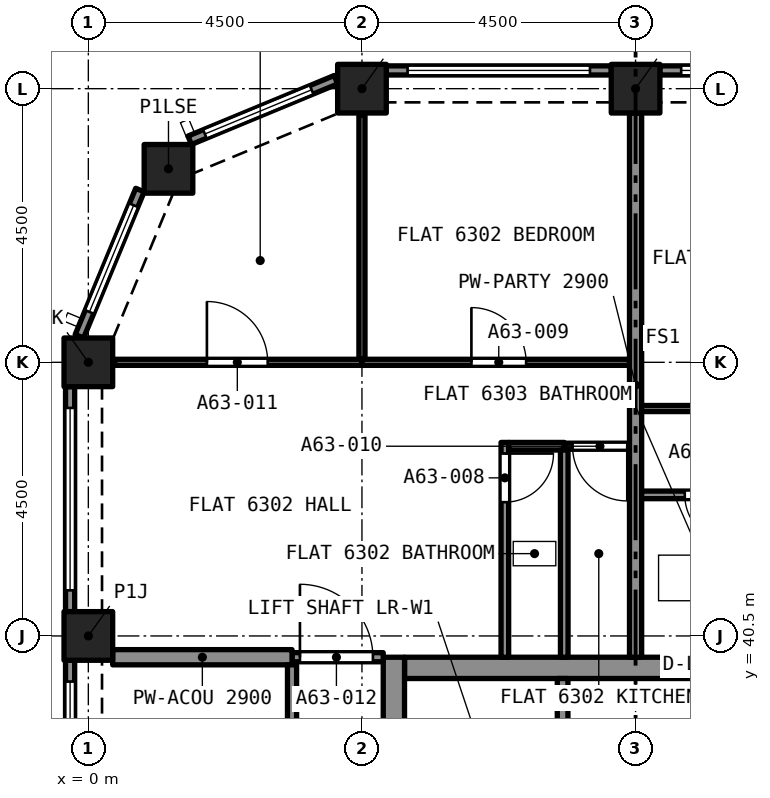
"""IFC4 building model, lengths in metres.
Left out: names, types, materials, properties, quantities, classifications, styles, units other than length and angle.
Written with IfcOpenShell. Run it as: python <this file> out.ifc"""

import sys

from ifc_helpers import new_model, si_unit, direction, frame, frame_2d, origin, origin_2d, place, context, subcontext, project, spatial, rectangle, extrude, element, fill, save


model = new_model("IFC4")
c1 = context("Model", 3, precision=1e-05, world=origin(), true_north=direction((0.0, 1.0)))
c2 = subcontext(c1, "Body", "Model", "MODEL_VIEW")
j1 = project(units=[si_unit("LENGTHUNIT", "METRE"), si_unit("PLANEANGLEUNIT", "RADIAN")], contexts=[c1])
p1 = place(None, origin())
s1 = spatial("IfcSite", under=j1, at=p1, CompositionType="ELEMENT")
p2 = place(p1, origin())
s2 = spatial("IfcBuilding", under=s1, at=p2, CompositionType="ELEMENT")
p3 = place(p2, frame((0.0, 0.0, 226.095)))
s3 = spatial("IfcBuildingStorey", under=s2, at=p3, CompositionType="ELEMENT", Elevation=226.095)
for number, where, z_axis, x_axis in (
    (1, (0.0, 40.5, 0.0), (0.0, 0.0, 1.0), (1.0, 0.0, 0.0)),
    (2, (0.0, 45.0, 0.0), (0.0, 0.0, 1.0), (1.0, 0.0, 0.0)),
    (3, (1.318, 48.182, 0.0), (0.0, 0.0, 1.0), (1.0, 0.0, 0.0)),
    (4, (4.5, 49.5, 0.0), (0.0, 0.0, 1.0), (1.0, 0.0, 0.0)),
    (5, (9.0, 49.5, 0.0), (0.0, 0.0, 1.0), (1.0, 0.0, 0.0)),
):
    element("IfcColumn", number, at=place(p3, frame(where, z_axis=z_axis, x_axis=x_axis)), inside=s3, PredefinedType="COLUMN", context=c2, shape_type="SweptSolid", body=[
        extrude(rectangle(XDim=0.8, YDim=0.8, at=origin_2d()), origin(), (0.0, 0.0, 1.0), 3.2),
    ])
p4 = place(p3, frame((5.2, 39.975, 0.0), z_axis=(0.0, 0.0, 1.0), x_axis=(1.0, 0.0, 0.0)))
e6 = element("IfcWall", 6, at=p4, inside=s3, PredefinedType="SOLIDWALL", context=c2, shape_type="SweptSolid", body=[
    extrude(rectangle(XDim=7.6, YDim=0.35, at=frame_2d((3.8, 0.0))), origin(), (0.0, 0.0, 1.0), 3.2),
])
p5 = place(p3, frame((5.025, 27.35, 0.0), z_axis=(0.0, 0.0, 1.0), x_axis=(0.0, 1.0, 0.0)))
e7 = element("IfcWall", 7, at=p5, inside=s3, PredefinedType="SOLIDWALL", context=c2, shape_type="SweptSolid", body=[
    extrude(rectangle(XDim=12.8, YDim=0.35, at=frame_2d((6.4, 0.0))), origin(), (0.0, 0.0, 1.0), 3.2),
])
p6 = place(p5, frame((8.6, 0.0, 0.0)))
e8 = element("IfcOpeningElement", 8, at=p6, cuts=e7, PredefinedType="OPENING", context=c2, shape_type="SweptSolid", body=[
    extrude(rectangle(XDim=1.2, YDim=2.1, at=frame_2d((0.6, 1.05))), frame((0.0, 0.185, 0.0), z_axis=(0.0, -1.0, 0.0), x_axis=(1.0, 0.0, 0.0)), (0.0, 0.0, 1.0), 0.37),
])
p7 = place(p3, frame((9.4, 49.8, 0.0), z_axis=(0.0, 0.0, 1.0), x_axis=(1.0, 0.0, 0.0)))
e9 = element("IfcWall", 9, at=p7, inside=s3, PredefinedType="SOLIDWALL", context=c2, shape_type="SweptSolid", body=[
    extrude(rectangle(XDim=3.7, YDim=0.15, at=frame_2d((1.85, 0.0))), origin(), (0.0, 0.0, 1.0), 3.2),
])
p8 = place(p7, frame((0.35, 0.0, 0.45)))
e10 = element("IfcOpeningElement", 10, at=p8, cuts=e9, PredefinedType="OPENING", context=c2, shape_type="SweptSolid", body=[
    extrude(rectangle(XDim=3.0, YDim=1.95, at=frame_2d((1.5, 0.975))), frame((0.0, 0.085, 0.0), z_axis=(0.0, -1.0, 0.0), x_axis=(1.0, 0.0, 0.0)), (0.0, 0.0, 1.0), 0.17),
])
p9 = place(p3, frame((4.9, 49.8, 0.0), z_axis=(0.0, 0.0, 1.0), x_axis=(1.0, 0.0, 0.0)))
e11 = element("IfcWall", 11, at=p9, inside=s3, PredefinedType="SOLIDWALL", context=c2, shape_type="SweptSolid", body=[
    extrude(rectangle(XDim=3.7, YDim=0.15, at=frame_2d((1.85, 0.0))), origin(), (0.0, 0.0, 1.0), 3.2),
])
p10 = place(p9, frame((0.35, 0.0, 0.45)))
e12 = element("IfcOpeningElement", 12, at=p10, cuts=e11, PredefinedType="OPENING", context=c2, shape_type="SweptSolid", body=[
    extrude(rectangle(XDim=3.0, YDim=1.95, at=frame_2d((1.5, 0.975))), frame((0.0, 0.085, 0.0), z_axis=(0.0, -1.0, 0.0), x_axis=(1.0, 0.0, 0.0)), (0.0, 0.0, 1.0), 0.17),
])
p11 = place(p3, frame((1.667, 48.651, 0.0), z_axis=(0.0, 0.0, 1.0), x_axis=(0.923885342263, 0.382669406082, 0.0)))
e13 = element("IfcWall", 13, at=p11, inside=s3, PredefinedType="SOLIDWALL", context=c2, shape_type="SweptSolid", body=[
    extrude(rectangle(XDim=2.602, YDim=0.15, at=frame_2d((1.301, 0.0))), origin(), (0.0, 0.0, 1.0), 3.2),
])
p12 = place(p11, frame((0.27, 0.0, 0.45)))
e14 = element("IfcOpeningElement", 14, at=p12, cuts=e13, PredefinedType="OPENING", context=c2, shape_type="SweptSolid", body=[
    extrude(rectangle(XDim=1.9, YDim=1.95, at=frame_2d((0.95, 0.975))), frame((0.0, 0.085, 0.0), z_axis=(0.0, -1.0, 0.0), x_axis=(1.0, 0.0, 0.0)), (0.0, 0.0, 1.0), 0.17),
])
p13 = place(p3, frame((-0.147, 45.429, 0.0), z_axis=(0.0, 0.0, 1.0), x_axis=(0.382669406082, 0.923885342263, 0.0)))
e15 = element("IfcWall", 15, at=p13, inside=s3, PredefinedType="SOLIDWALL", context=c2, shape_type="SweptSolid", body=[
    extrude(rectangle(XDim=2.602, YDim=0.15, at=frame_2d((1.301, 0.0))), origin(), (0.0, 0.0, 1.0), 3.2),
])
p14 = place(p13, frame((0.432, 0.0, 0.45)))
e16 = element("IfcOpeningElement", 16, at=p14, cuts=e15, PredefinedType="OPENING", context=c2, shape_type="SweptSolid", body=[
    extrude(rectangle(XDim=1.9, YDim=1.95, at=frame_2d((0.95, 0.975))), frame((0.0, 0.085, 0.0), z_axis=(0.0, -1.0, 0.0), x_axis=(1.0, 0.0, 0.0)), (0.0, 0.0, 1.0), 0.17),
])
p15 = place(p3, frame((-0.3, 40.9, 0.0), z_axis=(0.0, 0.0, 1.0), x_axis=(0.0, 1.0, 0.0)))
e17 = element("IfcWall", 17, at=p15, inside=s3, PredefinedType="SOLIDWALL", context=c2, shape_type="SweptSolid", body=[
    extrude(rectangle(XDim=3.7, YDim=0.15, at=frame_2d((1.85, 0.0))), origin(), (0.0, 0.0, 1.0), 3.2),
])
p16 = place(p15, frame((0.35, 0.0, 0.45)))
e18 = element("IfcOpeningElement", 18, at=p16, cuts=e17, PredefinedType="OPENING", context=c2, shape_type="SweptSolid", body=[
    extrude(rectangle(XDim=3.0, YDim=1.95, at=frame_2d((1.5, 0.975))), frame((0.0, 0.085, 0.0), z_axis=(0.0, -1.0, 0.0), x_axis=(1.0, 0.0, 0.0)), (0.0, 0.0, 1.0), 0.17),
])
p17 = place(p3, frame((-0.3, 36.4, 0.0), z_axis=(0.0, 0.0, 1.0), x_axis=(0.0, 1.0, 0.0)))
e19 = element("IfcWall", 19, at=p17, inside=s3, PredefinedType="SOLIDWALL", context=c2, shape_type="SweptSolid", body=[
    extrude(rectangle(XDim=3.7, YDim=0.15, at=frame_2d((1.85, 0.0))), origin(), (0.0, 0.0, 1.0), 3.2),
])
p18 = place(p17, frame((0.35, 0.0, 0.45)))
e20 = element("IfcOpeningElement", 20, at=p18, cuts=e19, PredefinedType="OPENING", context=c2, shape_type="SweptSolid", body=[
    extrude(rectangle(XDim=3.0, YDim=1.95, at=frame_2d((1.5, 0.975))), frame((0.0, 0.085, 0.0), z_axis=(0.0, -1.0, 0.0), x_axis=(1.0, 0.0, 0.0)), (0.0, 0.0, 1.0), 0.17),
])
p19 = place(p3, frame((6.85, 43.683, 0.0), z_axis=(0.0, 0.0, 1.0), x_axis=(0.0, -1.0, 0.0)))
e21 = element("IfcWall", 21, at=p19, inside=s3, PredefinedType="PARTITIONING", context=c2, shape_type="SweptSolid", body=[
    extrude(rectangle(XDim=3.533, YDim=0.125, at=frame_2d((1.766, 0.0))), origin(), (0.0, 0.0, 1.0), 2.9),
])
p20 = place(p19, frame((0.183, 0.0, 0.0)))
e22 = element("IfcOpeningElement", 22, at=p20, cuts=e21, PredefinedType="OPENING", context=c2, shape_type="SweptSolid", body=[
    extrude(rectangle(XDim=0.8, YDim=2.1, at=frame_2d((0.4, 1.05))), frame((0.0, 0.073, 0.0), z_axis=(0.0, -1.0, 0.0), x_axis=(1.0, 0.0, 0.0)), (0.0, 0.0, 1.0), 0.145),
])
p21 = place(p3, frame((6.913, 43.62, 0.0), z_axis=(0.0, 0.0, 1.0), x_axis=(1.0, 0.0, 0.0)))
e23 = element("IfcWall", 23, at=p21, inside=s3, PredefinedType="PARTITIONING", context=c2, shape_type="SweptSolid", body=[
    extrude(rectangle(XDim=0.915, YDim=0.125, at=frame_2d((0.458, 0.0))), origin(), (0.0, 0.0, 1.0), 2.9),
])
p22 = place(p3, frame((7.827, 40.15, 0.0), z_axis=(0.0, 0.0, 1.0), x_axis=(0.0, 1.0, 0.0)))
e24 = element("IfcWall", 24, at=p22, inside=s3, PredefinedType="PARTITIONING", context=c2, shape_type="SweptSolid", body=[
    extrude(rectangle(XDim=3.408, YDim=0.125, at=frame_2d((1.704, 0.0))), origin(), (0.0, 0.0, 1.0), 2.9),
])
p23 = place(p3, frame((4.5, 45.0, 0.0), z_axis=(0.0, 0.0, 1.0), x_axis=(1.0, 0.0, 0.0)))
e25 = element("IfcWall", 25, at=p23, inside=s3, PredefinedType="PARTITIONING", context=c2, shape_type="SweptSolid", body=[
    extrude(rectangle(XDim=4.4, YDim=0.1, at=frame_2d((2.2, 0.0))), origin(), (0.0, 0.0, 1.0), 2.9),
])
p24 = place(p23, frame((1.8, 0.0, 0.0)))
e26 = element("IfcOpeningElement", 26, at=p24, cuts=e25, PredefinedType="OPENING", context=c2, shape_type="SweptSolid", body=[
    extrude(rectangle(XDim=0.9, YDim=2.1, at=frame_2d((0.45, 1.05))), frame((0.0, 0.06, 0.0), z_axis=(0.0, -1.0, 0.0), x_axis=(1.0, 0.0, 0.0)), (0.0, 0.0, 1.0), 0.12),
])
p25 = place(p3, frame((4.5, 45.05, 0.0), z_axis=(0.0, 0.0, 1.0), x_axis=(0.0, 1.0, 0.0)))
e27 = element("IfcWall", 27, at=p25, inside=s3, PredefinedType="PARTITIONING", context=c2, shape_type="SweptSolid", body=[
    extrude(rectangle(XDim=4.017, YDim=0.1, at=frame_2d((2.009, 0.0))), origin(), (0.0, 0.0, 1.0), 2.9),
])
p26 = place(p3, frame((8.9, 43.62, 0.0), z_axis=(0.0, 0.0, 1.0), x_axis=(-1.0, 0.0, 0.0)))
e28 = element("IfcWall", 28, at=p26, inside=s3, PredefinedType="PARTITIONING", context=c2, shape_type="SweptSolid", body=[
    extrude(rectangle(XDim=1.073, YDim=0.1, at=frame_2d((0.536, 0.0))), origin(), (0.0, 0.0, 1.0), 2.9),
])
p27 = place(p26, frame((0.036, 0.0, 0.0)))
e29 = element("IfcOpeningElement", 29, at=p27, cuts=e28, PredefinedType="OPENING", context=c2, shape_type="SweptSolid", body=[
    extrude(rectangle(XDim=0.9, YDim=2.1, at=frame_2d((0.45, 1.05))), frame((0.0, 0.06, 0.0), z_axis=(0.0, -1.0, 0.0), x_axis=(1.0, 0.0, 0.0)), (0.0, 0.0, 1.0), 0.12),
])
p28 = place(p3, frame((0.433, 45.0, 0.0), z_axis=(0.0, 0.0, 1.0), x_axis=(1.0, 0.0, 0.0)))
e30 = element("IfcWall", 30, at=p28, inside=s3, PredefinedType="PARTITIONING", context=c2, shape_type="SweptSolid", body=[
    extrude(rectangle(XDim=4.067, YDim=0.1, at=frame_2d((2.034, 0.0))), origin(), (0.0, 0.0, 1.0), 2.9),
])
p29 = place(p28, frame((1.517, 0.0, 0.0)))
e31 = element("IfcOpeningElement", 31, at=p29, cuts=e30, PredefinedType="OPENING", context=c2, shape_type="SweptSolid", body=[
    extrude(rectangle(XDim=1.0, YDim=2.1, at=frame_2d((0.5, 1.05))), frame((0.0, 0.06, 0.0), z_axis=(0.0, -1.0, 0.0), x_axis=(1.0, 0.0, 0.0)), (0.0, 0.0, 1.0), 0.12),
])
p30 = place(p3, frame((3.35, 40.15, 0.0), z_axis=(0.0, 0.0, 1.0), x_axis=(1.0, 0.0, 0.0)))
e32 = element("IfcWall", 32, at=p30, inside=s3, PredefinedType="PARTITIONING", context=c2, shape_type="SweptSolid", body=[
    extrude(rectangle(XDim=1.5, YDim=0.15, at=frame_2d((0.75, 0.0))), origin(), (0.0, 0.0, 1.0), 2.9),
])
p31 = place(p30, frame((0.13, 0.0, 0.0)))
e33 = element("IfcOpeningElement", 33, at=p31, cuts=e32, PredefinedType="OPENING", context=c2, shape_type="SweptSolid", body=[
    extrude(rectangle(XDim=1.2, YDim=2.4, at=frame_2d((0.6, 1.2))), frame((0.0, 0.085, 0.0), z_axis=(0.0, -1.0, 0.0), x_axis=(1.0, 0.0, 0.0)), (0.0, 0.0, 1.0), 0.17),
])
p32 = place(p3, frame((0.4, 40.15, 0.0), z_axis=(0.0, 0.0, 1.0), x_axis=(1.0, 0.0, 0.0)))
e34 = element("IfcWall", 34, at=p32, inside=s3, PredefinedType="PARTITIONING", context=c2, shape_type="SweptSolid", body=[
    extrude(rectangle(XDim=2.95, YDim=0.25, at=frame_2d((1.475, 0.0))), origin(), (0.0, 0.0, 1.0), 2.9),
])
p33 = place(p3, frame((9.0, 40.15, 0.0), z_axis=(0.0, 0.0, 1.0), x_axis=(0.0, 1.0, 0.0)))
e35 = element("IfcWall", 35, at=p33, inside=s3, PredefinedType="PARTITIONING", context=c2, shape_type="SweptSolid", body=[
    extrude(rectangle(XDim=8.95, YDim=0.2, at=frame_2d((4.475, 0.0))), origin(), (0.0, 0.0, 1.0), 2.9),
])
p34 = place(p3, frame((11.418, 42.82, 0.0), z_axis=(0.0, 0.0, 1.0), x_axis=(-1.0, 0.0, 0.0)))
e36 = element("IfcWall", 36, at=p34, inside=s3, PredefinedType="PARTITIONING", context=c2, shape_type="SweptSolid", body=[
    extrude(rectangle(XDim=2.318, YDim=0.125, at=frame_2d((1.159, 0.0))), origin(), (0.0, 0.0, 1.0), 2.9),
])
p35 = place(p34, frame((0.809, 0.0, 0.0)))
e37 = element("IfcOpeningElement", 37, at=p35, cuts=e36, PredefinedType="OPENING", context=c2, shape_type="SweptSolid", body=[
    extrude(rectangle(XDim=0.8, YDim=2.1, at=frame_2d((0.4, 1.05))), frame((0.0, 0.073, 0.0), z_axis=(0.0, -1.0, 0.0), x_axis=(1.0, 0.0, 0.0)), (0.0, 0.0, 1.0), 0.145),
])
p36 = place(p3, frame((9.1, 44.24, 0.0), z_axis=(0.0, 0.0, 1.0), x_axis=(1.0, 0.0, 0.0)))
e38 = element("IfcWall", 38, at=p36, inside=s3, PredefinedType="PARTITIONING", context=c2, shape_type="SweptSolid", body=[
    extrude(rectangle(XDim=4.4, YDim=0.1, at=frame_2d((2.2, 0.0))), origin(), (0.0, 0.0, 1.0), 2.9),
])
p37 = place(p36, frame((1.65, 0.0, 0.0)))
e39 = element("IfcOpeningElement", 39, at=p37, cuts=e38, PredefinedType="OPENING", context=c2, shape_type="SweptSolid", body=[
    extrude(rectangle(XDim=1.0, YDim=2.1, at=frame_2d((0.5, 1.05))), frame((0.0, 0.06, 0.0), z_axis=(0.0, -1.0, 0.0), x_axis=(1.0, 0.0, 0.0)), (0.0, 0.0, 1.0), 0.12),
])
p38 = place(p3, frame((3.35, 36.0, 0.0), z_axis=(0.0, 0.0, 1.0), x_axis=(0.0, 1.0, 0.0)))
e40 = element("IfcWall", 40, at=p38, inside=s3, PredefinedType="PARTITIONING", context=c2, shape_type="SweptSolid", body=[
    extrude(rectangle(XDim=4.025, YDim=0.15, at=frame_2d((2.012, 0.0))), origin(), (0.0, 0.0, 1.0), 2.9),
])
p39 = place(p38, frame((1.575, 0.0, 0.0)))
e41 = element("IfcOpeningElement", 41, at=p39, cuts=e40, PredefinedType="OPENING", context=c2, shape_type="SweptSolid", body=[
    extrude(rectangle(XDim=1.0, YDim=2.1, at=frame_2d((0.5, 1.05))), frame((0.0, 0.085, 0.0), z_axis=(0.0, -1.0, 0.0), x_axis=(1.0, 0.0, 0.0)), (0.0, 0.0, 1.0), 0.17),
])
p40 = place(p3, frame((7.8, 37.5, 0.0), z_axis=(0.0, 0.0, 1.0), x_axis=(0.0, 1.0, 0.0)))
e42 = element("IfcWall", 42, at=p40, inside=s3, PredefinedType="SOLIDWALL", context=c2, shape_type="SweptSolid", body=[
    extrude(rectangle(XDim=2.3, YDim=0.175, at=frame_2d((1.15, 0.0))), origin(), (0.0, 0.0, 1.0), 2.9),
])
p41 = place(p8, origin())
e43 = element("IfcWindow", 43, at=p41, inside=s3, PartitioningType="SINGLE_PANEL", PredefinedType="WINDOW", context=c2, shape_type="SweptSolid", body=[
    extrude(rectangle(XDim=3.0, YDim=1.95, at=frame_2d((1.5, 0.975))), frame((0.0, 0.03, 0.0), z_axis=(0.0, -1.0, 0.0), x_axis=(1.0, 0.0, 0.0)), (0.0, 0.0, 1.0), 0.06),
])
fill(e10, e43)
p42 = place(p10, origin())
e44 = element("IfcWindow", 44, at=p42, inside=s3, PartitioningType="SINGLE_PANEL", PredefinedType="WINDOW", context=c2, shape_type="SweptSolid", body=[
    extrude(rectangle(XDim=3.0, YDim=1.95, at=frame_2d((1.5, 0.975))), frame((0.0, 0.03, 0.0), z_axis=(0.0, -1.0, 0.0), x_axis=(1.0, 0.0, 0.0)), (0.0, 0.0, 1.0), 0.06),
])
fill(e12, e44)
p43 = place(p12, origin())
e45 = element("IfcWindow", 45, at=p43, inside=s3, PartitioningType="SINGLE_PANEL", PredefinedType="WINDOW", context=c2, shape_type="SweptSolid", body=[
    extrude(rectangle(XDim=1.9, YDim=1.95, at=frame_2d((0.95, 0.975))), frame((0.0, 0.03, 0.0), z_axis=(0.0, -1.0, 0.0), x_axis=(1.0, 0.0, 0.0)), (0.0, 0.0, 1.0), 0.06),
])
fill(e14, e45)
p44 = place(p14, origin())
e46 = element("IfcWindow", 46, at=p44, inside=s3, PartitioningType="SINGLE_PANEL", PredefinedType="WINDOW", context=c2, shape_type="SweptSolid", body=[
    extrude(rectangle(XDim=1.9, YDim=1.95, at=frame_2d((0.95, 0.975))), frame((0.0, 0.03, 0.0), z_axis=(0.0, -1.0, 0.0), x_axis=(1.0, 0.0, 0.0)), (0.0, 0.0, 1.0), 0.06),
])
fill(e16, e46)
p45 = place(p16, origin())
e47 = element("IfcWindow", 47, at=p45, inside=s3, PartitioningType="SINGLE_PANEL", PredefinedType="WINDOW", context=c2, shape_type="SweptSolid", body=[
    extrude(rectangle(XDim=3.0, YDim=1.95, at=frame_2d((1.5, 0.975))), frame((0.0, 0.03, 0.0), z_axis=(0.0, -1.0, 0.0), x_axis=(1.0, 0.0, 0.0)), (0.0, 0.0, 1.0), 0.06),
])
fill(e18, e47)
p46 = place(p18, origin())
e48 = element("IfcWindow", 48, at=p46, inside=s3, PartitioningType="SINGLE_PANEL", PredefinedType="WINDOW", context=c2, shape_type="SweptSolid", body=[
    extrude(rectangle(XDim=3.0, YDim=1.95, at=frame_2d((1.5, 0.975))), frame((0.0, 0.03, 0.0), z_axis=(0.0, -1.0, 0.0), x_axis=(1.0, 0.0, 0.0)), (0.0, 0.0, 1.0), 0.06),
])
fill(e20, e48)
p47 = place(p20, origin())
e49 = element("IfcDoor", 49, at=p47, inside=s3, OperationType="SINGLE_SWING_LEFT", PredefinedType="DOOR", context=c2, shape_type="SweptSolid", body=[
    extrude(rectangle(XDim=0.8, YDim=2.1, at=frame_2d((0.4, 1.05))), frame((0.0, 0.025, 0.0), z_axis=(0.0, -1.0, 0.0), x_axis=(1.0, 0.0, 0.0)), (0.0, 0.0, 1.0), 0.05),
])
fill(e22, e49)
p48 = place(p24, origin())
e50 = element("IfcDoor", 50, at=p48, inside=s3, OperationType="SINGLE_SWING_RIGHT", PredefinedType="DOOR", context=c2, shape_type="SweptSolid", body=[
    extrude(rectangle(XDim=0.9, YDim=2.1, at=frame_2d((0.45, 1.05))), frame((0.0, 0.025, 0.0), z_axis=(0.0, -1.0, 0.0), x_axis=(1.0, 0.0, 0.0)), (0.0, 0.0, 1.0), 0.05),
])
fill(e26, e50)
p49 = place(p27, origin())
e51 = element("IfcDoor", 51, at=p49, inside=s3, OperationType="SINGLE_SWING_LEFT", PredefinedType="DOOR", context=c2, shape_type="SweptSolid", body=[
    extrude(rectangle(XDim=0.9, YDim=2.1, at=frame_2d((0.45, 1.05))), frame((0.0, 0.025, 0.0), z_axis=(0.0, -1.0, 0.0), x_axis=(1.0, 0.0, 0.0)), (0.0, 0.0, 1.0), 0.05),
])
fill(e29, e51)
p50 = place(p29, origin())
e52 = element("IfcDoor", 52, at=p50, inside=s3, OperationType="SINGLE_SWING_LEFT", PredefinedType="DOOR", context=c2, shape_type="SweptSolid", body=[
    extrude(rectangle(XDim=1.0, YDim=2.1, at=frame_2d((0.5, 1.05))), frame((0.0, 0.025, 0.0), z_axis=(0.0, -1.0, 0.0), x_axis=(1.0, 0.0, 0.0)), (0.0, 0.0, 1.0), 0.05),
])
fill(e31, e52)
p51 = place(p31, origin())
e53 = element("IfcDoor", 53, at=p51, inside=s3, OperationType="SINGLE_SWING_LEFT", PredefinedType="DOOR", context=c2, shape_type="SweptSolid", body=[
    extrude(rectangle(XDim=1.2, YDim=2.4, at=frame_2d((0.6, 1.2))), frame((0.0, 0.025, 0.0), z_axis=(0.0, -1.0, 0.0), x_axis=(1.0, 0.0, 0.0)), (0.0, 0.0, 1.0), 0.05),
])
fill(e33, e53)
p52 = place(p35, origin())
e54 = element("IfcDoor", 54, at=p52, inside=s3, OperationType="SINGLE_SWING_RIGHT", PredefinedType="DOOR", context=c2, shape_type="SweptSolid", body=[
    extrude(rectangle(XDim=0.8, YDim=2.1, at=frame_2d((0.4, 1.05))), frame((0.0, 0.025, 0.0), z_axis=(0.0, -1.0, 0.0), x_axis=(1.0, 0.0, 0.0)), (0.0, 0.0, 1.0), 0.05),
])
fill(e37, e54)
save(model, sys.argv[1])
